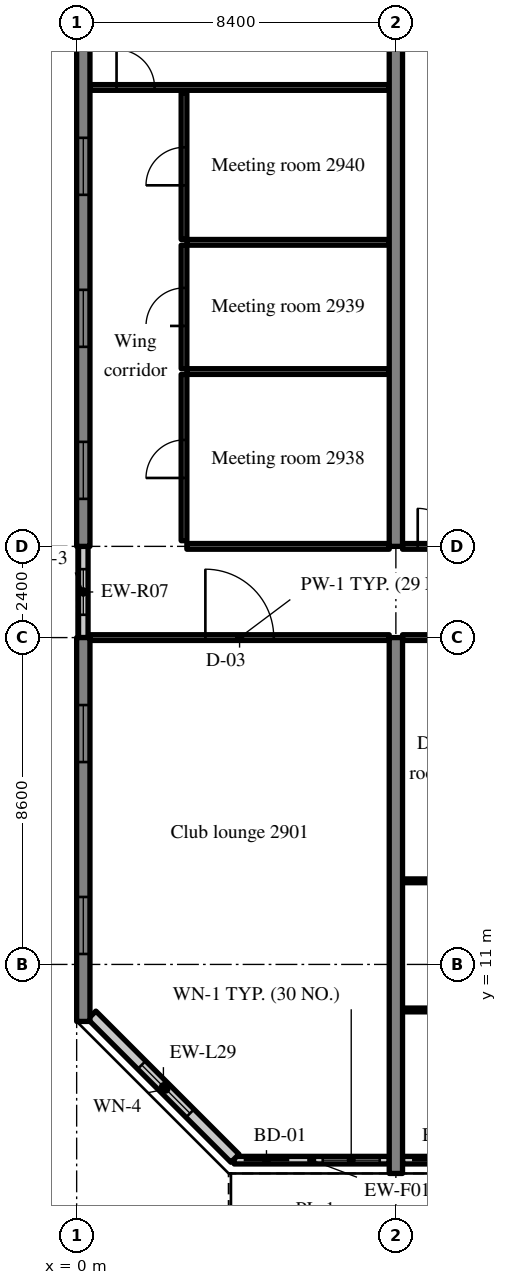
"""IFC4 building model, lengths in metres.
Left out: names, types, materials, properties, quantities, classifications, styles, units other than length and angle.
Written with IfcOpenShell. Run it as: python <this file> out.ifc"""

import sys

from ifc_helpers import new_model, si_unit, direction, frame, frame_2d, origin, place, context, subcontext, project, spatial, rectangle, extrude, source, transform, mapped, element, fill, save


model = new_model("IFC4")
c1 = context("Model", 3, precision=1e-05, world=origin(), true_north=direction((0.0, 1.0)))
c2 = subcontext(c1, "Body", "Model", "MODEL_VIEW")
j1 = project(units=[si_unit("LENGTHUNIT", "METRE"), si_unit("PLANEANGLEUNIT", "RADIAN")], contexts=[c1])
p1 = place(None, origin())
s1 = spatial("IfcSite", under=j1, at=p1, CompositionType="ELEMENT")
p2 = place(p1, origin())
s2 = spatial("IfcBuilding", under=s1, at=p2, CompositionType="ELEMENT")
p3 = place(p2, frame((0.0, 0.0, 121.8)))
s3 = spatial("IfcBuildingStorey", under=s2, at=p3, CompositionType="ELEMENT", Elevation=121.8)
m1 = source(origin(), c2, "Body", "SweptSolid", [
    extrude(rectangle(XDim=10.1, YDim=0.35, at=frame_2d((5.05, 0.0))), origin(), (0.0, 0.0, 1.0), 3.52),
])
p4 = place(p3, frame((0.175, 9.5, 0.0), z_axis=(0.0, 0.0, 1.0), x_axis=(0.0, 1.0, 0.0)))
e1 = element("IfcWall", 1, at=p4, inside=s3, PredefinedType="SHEAR", context=c2, shape_type="MappedRepresentation", body=[
    mapped(m1, transform((0.0, 0.0, 0.0), scale=1.0)),
])
m2 = source(origin(), c2, "Body", "SweptSolid", [
    extrude(rectangle(XDim=1.5, YDim=1.5, at=frame_2d((0.75, 0.75))), frame((0.0, 0.185, 0.0), z_axis=(0.0, -1.0, 0.0), x_axis=(1.0, 0.0, 0.0)), (0.0, 0.0, 1.0), 0.37),
])
p5 = place(p4, frame((1.775, 0.0, 0.9)))
e2 = element("IfcOpeningElement", 2, at=p5, cuts=e1, PredefinedType="OPENING", context=c2, shape_type="MappedRepresentation", body=[
    mapped(m2, transform((0.0, 0.0, 0.0), scale=1.0)),
])
p6 = place(p4, frame((6.825, 0.0, 0.9)))
e3 = element("IfcOpeningElement", 3, at=p6, cuts=e1, PredefinedType="OPENING", context=c2, shape_type="MappedRepresentation", body=[
    mapped(m2, transform((0.0, 0.0, 0.0), scale=1.0)),
])
m3 = source(origin(), c2, "Body", "SweptSolid", [
    extrude(rectangle(XDim=16.0, YDim=0.35, at=frame_2d((8.0, 0.0))), origin(), (0.0, 0.0, 1.0), 3.52),
])
p7 = place(p3, frame((0.175, 22.0, 0.0), z_axis=(0.0, 0.0, 1.0), x_axis=(0.0, 1.0, 0.0)))
e4 = element("IfcWall", 4, at=p7, inside=s3, PredefinedType="SHEAR", context=c2, shape_type="MappedRepresentation", body=[
    mapped(m3, transform((0.0, 0.0, 0.0), scale=1.0)),
])
p8 = place(p7, frame((1.25, 0.0, 0.9)))
e5 = element("IfcOpeningElement", 5, at=p8, cuts=e4, PredefinedType="OPENING", context=c2, shape_type="MappedRepresentation", body=[
    mapped(m2, transform((0.0, 0.0, 0.0), scale=1.0)),
])
p9 = place(p7, frame((5.25, 0.0, 0.9)))
e6 = element("IfcOpeningElement", 6, at=p9, cuts=e4, PredefinedType="OPENING", context=c2, shape_type="MappedRepresentation", body=[
    mapped(m2, transform((0.0, 0.0, 0.0), scale=1.0)),
])
p10 = place(p7, frame((9.25, 0.0, 0.9)))
e7 = element("IfcOpeningElement", 7, at=p10, cuts=e4, PredefinedType="OPENING", context=c2, shape_type="MappedRepresentation", body=[
    mapped(m2, transform((0.0, 0.0, 0.0), scale=1.0)),
])
p11 = place(p7, frame((13.25, 0.0, 0.9)))
e8 = element("IfcOpeningElement", 8, at=p11, cuts=e4, PredefinedType="OPENING", context=c2, shape_type="MappedRepresentation", body=[
    mapped(m2, transform((0.0, 0.0, 0.0), scale=1.0)),
])
m4 = source(origin(), c2, "Body", "SweptSolid", [
    extrude(rectangle(XDim=14.1, YDim=0.35, at=frame_2d((7.05, 0.0))), origin(), (0.0, 0.0, 1.0), 3.52),
])
p12 = place(p3, frame((8.4, 5.5, 0.0), z_axis=(0.0, 0.0, 1.0), x_axis=(0.0, 1.0, 0.0)))
e9 = element("IfcWall", 9, at=p12, inside=s3, PredefinedType="SHEAR", context=c2, shape_type="MappedRepresentation", body=[
    mapped(m4, transform((0.0, 0.0, 0.0), scale=1.0)),
])
m5 = source(origin(), c2, "Body", "SweptSolid", [
    extrude(rectangle(XDim=20.0, YDim=0.35, at=frame_2d((10.0, 0.0))), origin(), (0.0, 0.0, 1.0), 3.52),
])
p13 = place(p3, frame((8.4, 22.0, 0.0), z_axis=(0.0, 0.0, 1.0), x_axis=(0.0, 1.0, 0.0)))
e10 = element("IfcWall", 10, at=p13, inside=s3, PredefinedType="SHEAR", context=c2, shape_type="MappedRepresentation", body=[
    mapped(m5, transform((0.0, 0.0, 0.0), scale=1.0)),
])
m6 = source(origin(), c2, "Body", "SweptSolid", [
    extrude(rectangle(XDim=4.08, YDim=0.2, at=frame_2d((2.04, 0.0))), origin(), (0.0, 0.0, 1.0), 2.82),
])
p14 = place(p3, frame((4.145, 5.85, 0.0), z_axis=(0.0, 0.0, 1.0), x_axis=(1.0, 0.0, 0.0)))
e11 = element("IfcWall", 11, at=p14, inside=s3, PredefinedType="SOLIDWALL", context=c2, shape_type="MappedRepresentation", body=[
    mapped(m6, transform((0.0, 0.0, 0.0), scale=1.0)),
])
m7 = source(origin(), c2, "Body", "SweptSolid", [
    extrude(rectangle(XDim=1.2, YDim=2.4, at=frame_2d((0.6, 1.2))), frame((0.0, 0.11, 0.0), z_axis=(0.0, -1.0, 0.0), x_axis=(1.0, 0.0, 0.0)), (0.0, 0.0, 1.0), 0.22),
])
p15 = place(p14, frame((0.25, 0.0, 0.0)))
e12 = element("IfcOpeningElement", 12, at=p15, cuts=e11, PredefinedType="OPENING", context=c2, shape_type="MappedRepresentation", body=[
    mapped(m7, transform((0.0, 0.0, 0.0), scale=1.0)),
])
m8 = source(origin(), c2, "Body", "SweptSolid", [
    extrude(rectangle(XDim=1.5, YDim=1.5, at=frame_2d((0.75, 0.75))), frame((0.0, 0.11, 0.0), z_axis=(0.0, -1.0, 0.0), x_axis=(1.0, 0.0, 0.0)), (0.0, 0.0, 1.0), 0.22),
])
p16 = place(p14, frame((2.33, 0.0, 0.9)))
e13 = element("IfcOpeningElement", 13, at=p16, cuts=e11, PredefinedType="OPENING", context=c2, shape_type="MappedRepresentation", body=[
    mapped(m8, transform((0.0, 0.0, 0.0), scale=1.0)),
])
m9 = source(origin(), c2, "Body", "SweptSolid", [
    extrude(rectangle(XDim=8.05, YDim=0.2, at=frame_2d((4.025, 0.0))), origin(), (0.0, 0.0, 1.0), 2.82),
])
p17 = place(p3, frame((8.575, 5.85, 0.0), z_axis=(0.0, 0.0, 1.0), x_axis=(1.0, 0.0, 0.0)))
e14 = element("IfcWall", 14, at=p17, inside=s3, PredefinedType="SOLIDWALL", context=c2, shape_type="MappedRepresentation", body=[
    mapped(m9, transform((0.0, 0.0, 0.0), scale=1.0)),
])
p18 = place(p17, frame((0.25, 0.0, 0.0)))
e15 = element("IfcOpeningElement", 15, at=p18, cuts=e14, PredefinedType="OPENING", context=c2, shape_type="MappedRepresentation", body=[
    mapped(m7, transform((0.0, 0.0, 0.0), scale=1.0)),
])
p19 = place(p17, frame((2.275, 0.0, 0.9)))
e16 = element("IfcOpeningElement", 16, at=p19, cuts=e14, PredefinedType="OPENING", context=c2, shape_type="MappedRepresentation", body=[
    mapped(m8, transform((0.0, 0.0, 0.0), scale=1.0)),
])
p20 = place(p17, frame((4.275, 0.0, 0.0)))
e17 = element("IfcOpeningElement", 17, at=p20, cuts=e14, PredefinedType="OPENING", context=c2, shape_type="MappedRepresentation", body=[
    mapped(m7, transform((0.0, 0.0, 0.0), scale=1.0)),
])
p21 = place(p17, frame((6.3, 0.0, 0.9)))
e18 = element("IfcOpeningElement", 18, at=p21, cuts=e14, PredefinedType="OPENING", context=c2, shape_type="MappedRepresentation", body=[
    mapped(m8, transform((0.0, 0.0, 0.0), scale=1.0)),
])
m10 = source(origin(), c2, "Body", "SweptSolid", [
    extrude(rectangle(XDim=5.326, YDim=0.3, at=frame_2d((2.663, 0.0))), origin(), (0.0, 0.0, 1.0), 3.52),
])
p22 = place(p3, frame((0.4, 9.666, 0.0), z_axis=(0.0, 0.0, 1.0), x_axis=(0.707106781187, -0.707106781187, 0.0)))
e19 = element("IfcWall", 19, at=p22, inside=s3, PredefinedType="SOLIDWALL", context=c2, shape_type="MappedRepresentation", body=[
    mapped(m10, transform((0.0, 0.0, 0.0), scale=1.0)),
])
m11 = source(origin(), c2, "Body", "SweptSolid", [
    extrude(rectangle(XDim=1.8, YDim=1.5, at=frame_2d((0.9, 0.75))), frame((0.0, 0.16, 0.0), z_axis=(0.0, -1.0, 0.0), x_axis=(1.0, 0.0, 0.0)), (0.0, 0.0, 1.0), 0.32),
])
p23 = place(p22, frame((1.854, 0.0, 0.9)))
e20 = element("IfcOpeningElement", 20, at=p23, cuts=e19, PredefinedType="OPENING", context=c2, shape_type="MappedRepresentation", body=[
    mapped(m11, transform((0.0, 0.0, 0.0), scale=1.0)),
])
m12 = source(origin(), c2, "Body", "SweptSolid", [
    extrude(rectangle(XDim=2.4, YDim=0.25, at=frame_2d((1.2, 0.0))), origin(), (0.0, 0.0, 1.0), 2.62),
])
p24 = place(p3, frame((0.175, 19.6, 0.0), z_axis=(0.0, 0.0, 1.0), x_axis=(0.0, 1.0, 0.0)))
e21 = element("IfcWall", 21, at=p24, inside=s3, PredefinedType="SOLIDWALL", context=c2, shape_type="MappedRepresentation", body=[
    mapped(m12, transform((0.0, 0.0, 0.0), scale=1.0)),
])
m13 = source(origin(), c2, "Body", "SweptSolid", [
    extrude(rectangle(XDim=1.2, YDim=1.5, at=frame_2d((0.6, 0.75))), frame((0.0, 0.135, 0.0), z_axis=(0.0, -1.0, 0.0), x_axis=(1.0, 0.0, 0.0)), (0.0, 0.0, 1.0), 0.27),
])
p25 = place(p24, frame((0.6, 0.0, 0.9)))
e22 = element("IfcOpeningElement", 22, at=p25, cuts=e21, PredefinedType="OPENING", context=c2, shape_type="MappedRepresentation", body=[
    mapped(m13, transform((0.0, 0.0, 0.0), scale=1.0)),
])
m14 = source(origin(), c2, "Body", "SweptSolid", [
    extrude(rectangle(XDim=7.875, YDim=0.15, at=frame_2d((3.938, 0.0))), origin(), (0.0, 0.0, 1.0), 2.82),
])
p26 = place(p3, frame((0.35, 19.6, 0.0), z_axis=(0.0, 0.0, 1.0), x_axis=(1.0, 0.0, 0.0)))
e23 = element("IfcWall", 23, at=p26, inside=s3, PredefinedType="PARTITIONING", context=c2, shape_type="MappedRepresentation", body=[
    mapped(m14, transform((0.0, 0.0, 0.0), scale=1.0)),
])
m15 = source(origin(), c2, "Body", "SweptSolid", [
    extrude(rectangle(XDim=1.8, YDim=2.1, at=frame_2d((0.9, 1.05))), frame((0.0, 0.085, 0.0), z_axis=(0.0, -1.0, 0.0), x_axis=(1.0, 0.0, 0.0)), (0.0, 0.0, 1.0), 0.17),
])
p27 = place(p26, frame((3.037, 0.0, 0.0)))
e24 = element("IfcOpeningElement", 24, at=p27, cuts=e23, PredefinedType="OPENING", context=c2, shape_type="MappedRepresentation", body=[
    mapped(m15, transform((0.0, 0.0, 0.0), scale=1.0)),
])
m16 = source(origin(), c2, "Body", "SweptSolid", [
    extrude(rectangle(XDim=2.6, YDim=0.1, at=frame_2d((1.3, 0.0))), origin(), (0.0, 0.0, 1.0), 3.52),
])
p28 = place(p3, frame((8.575, 13.2, 0.0), z_axis=(0.0, 0.0, 1.0), x_axis=(1.0, 0.0, 0.0)))
e25 = element("IfcWall", 25, at=p28, inside=s3, PredefinedType="PARTITIONING", context=c2, shape_type="MappedRepresentation", body=[
    mapped(m16, transform((0.0, 0.0, 0.0), scale=1.0)),
])
m17 = source(origin(), c2, "Body", "SweptSolid", [
    extrude(rectangle(XDim=0.9, YDim=2.1, at=frame_2d((0.45, 1.05))), frame((0.0, 0.06, 0.0), z_axis=(0.0, -1.0, 0.0), x_axis=(1.0, 0.0, 0.0)), (0.0, 0.0, 1.0), 0.12),
])
p29 = place(p28, frame((0.85, 0.0, 0.0)))
e26 = element("IfcOpeningElement", 26, at=p29, cuts=e25, PredefinedType="OPENING", context=c2, shape_type="MappedRepresentation", body=[
    mapped(m17, transform((0.0, 0.0, 0.0), scale=1.0)),
])
m18 = source(origin(), c2, "Body", "SweptSolid", [
    extrude(rectangle(XDim=8.05, YDim=0.1, at=frame_2d((4.025, 0.0))), origin(), (0.0, 0.0, 1.0), 3.52),
])
p30 = place(p3, frame((8.575, 9.802, 0.0), z_axis=(0.0, 0.0, 1.0), x_axis=(1.0, 0.0, 0.0)))
e27 = element("IfcWall", 27, at=p30, inside=s3, PredefinedType="PARTITIONING", context=c2, shape_type="MappedRepresentation", body=[
    mapped(m18, transform((0.0, 0.0, 0.0), scale=1.0)),
])
m19 = source(origin(), c2, "Body", "SweptSolid", [
    extrude(rectangle(XDim=1.8, YDim=2.1, at=frame_2d((0.9, 1.05))), frame((0.0, 0.06, 0.0), z_axis=(0.0, -1.0, 0.0), x_axis=(1.0, 0.0, 0.0)), (0.0, 0.0, 1.0), 0.12),
])
p31 = place(p30, frame((3.125, 0.0, 0.0)))
e28 = element("IfcOpeningElement", 28, at=p31, cuts=e27, PredefinedType="OPENING", context=c2, shape_type="MappedRepresentation", body=[
    mapped(m19, transform((0.0, 0.0, 0.0), scale=1.0)),
])
m20 = source(origin(), c2, "Body", "SweptSolid", [
    extrude(rectangle(XDim=8.05, YDim=0.15, at=frame_2d((4.025, 0.0))), origin(), (0.0, 0.0, 1.0), 2.82),
])
p32 = place(p3, frame((8.575, 19.6, 0.0), z_axis=(0.0, 0.0, 1.0), x_axis=(1.0, 0.0, 0.0)))
e29 = element("IfcWall", 29, at=p32, inside=s3, PredefinedType="PARTITIONING", context=c2, shape_type="MappedRepresentation", body=[
    mapped(m20, transform((0.0, 0.0, 0.0), scale=1.0)),
])
m21 = source(origin(), c2, "Body", "SweptSolid", [
    extrude(rectangle(XDim=1.0, YDim=2.1, at=frame_2d((0.5, 1.05))), frame((0.0, 0.085, 0.0), z_axis=(0.0, -1.0, 0.0), x_axis=(1.0, 0.0, 0.0)), (0.0, 0.0, 1.0), 0.17),
])
p33 = place(p32, frame((6.65, 0.0, 0.0)))
e30 = element("IfcOpeningElement", 30, at=p33, cuts=e29, PredefinedType="OPENING", context=c2, shape_type="MappedRepresentation", body=[
    mapped(m21, transform((0.0, 0.0, 0.0), scale=1.0)),
])
m22 = source(origin(), c2, "Body", "SweptSolid", [
    extrude(rectangle(XDim=5.325, YDim=0.15, at=frame_2d((2.663, 0.0))), origin(), (0.0, 0.0, 1.0), 2.82),
])
p34 = place(p3, frame((2.9, 22.0, 0.0), z_axis=(0.0, 0.0, 1.0), x_axis=(1.0, 0.0, 0.0)))
e31 = element("IfcWall", 31, at=p34, inside=s3, PredefinedType="PARTITIONING", context=c2, shape_type="MappedRepresentation", body=[
    mapped(m22, transform((0.0, 0.0, 0.0), scale=1.0)),
])
m23 = source(origin(), c2, "Body", "SweptSolid", [
    extrude(rectangle(XDim=4.375, YDim=0.15, at=frame_2d((2.188, 0.0))), origin(), (0.0, 0.0, 1.0), 3.52),
])
p35 = place(p3, frame((2.825, 22.15, 0.0), z_axis=(0.0, 0.0, 1.0), x_axis=(0.0, 1.0, 0.0)))
e32 = element("IfcWall", 32, at=p35, inside=s3, PredefinedType="PARTITIONING", context=c2, shape_type="MappedRepresentation", body=[
    mapped(m23, transform((0.0, 0.0, 0.0), scale=1.0)),
])
p36 = place(p35, frame((1.65, 0.0, 0.0)))
e33 = element("IfcOpeningElement", 33, at=p36, cuts=e32, PredefinedType="OPENING", context=c2, shape_type="MappedRepresentation", body=[
    mapped(m21, transform((0.0, 0.0, 0.0), scale=1.0)),
])
m24 = source(origin(), c2, "Body", "SweptSolid", [
    extrude(rectangle(XDim=5.325, YDim=0.15, at=frame_2d((2.663, 0.0))), origin(), (0.0, 0.0, 1.0), 3.52),
])
p37 = place(p3, frame((2.9, 26.6, 0.0), z_axis=(0.0, 0.0, 1.0), x_axis=(1.0, 0.0, 0.0)))
e34 = element("IfcWall", 34, at=p37, inside=s3, PredefinedType="PARTITIONING", context=c2, shape_type="MappedRepresentation", body=[
    mapped(m24, transform((0.0, 0.0, 0.0), scale=1.0)),
])
m25 = source(origin(), c2, "Body", "SweptSolid", [
    extrude(rectangle(XDim=3.25, YDim=0.15, at=frame_2d((1.625, 0.0))), origin(), (0.0, 0.0, 1.0), 3.52),
])
p38 = place(p3, frame((2.825, 26.675, 0.0), z_axis=(0.0, 0.0, 1.0), x_axis=(0.0, 1.0, 0.0)))
e35 = element("IfcWall", 35, at=p38, inside=s3, PredefinedType="PARTITIONING", context=c2, shape_type="MappedRepresentation", body=[
    mapped(m25, transform((0.0, 0.0, 0.0), scale=1.0)),
])
p39 = place(p38, frame((1.125, 0.0, 0.0)))
e36 = element("IfcOpeningElement", 36, at=p39, cuts=e35, PredefinedType="OPENING", context=c2, shape_type="MappedRepresentation", body=[
    mapped(m21, transform((0.0, 0.0, 0.0), scale=1.0)),
])
p40 = place(p3, frame((2.9, 30.0, 0.0), z_axis=(0.0, 0.0, 1.0), x_axis=(1.0, 0.0, 0.0)))
e37 = element("IfcWall", 37, at=p40, inside=s3, PredefinedType="PARTITIONING", context=c2, shape_type="MappedRepresentation", body=[
    mapped(m24, transform((0.0, 0.0, 0.0), scale=1.0)),
])
m26 = source(origin(), c2, "Body", "SweptSolid", [
    extrude(rectangle(XDim=3.85, YDim=0.15, at=frame_2d((1.925, 0.0))), origin(), (0.0, 0.0, 1.0), 3.52),
])
p41 = place(p3, frame((2.825, 30.075, 0.0), z_axis=(0.0, 0.0, 1.0), x_axis=(0.0, 1.0, 0.0)))
e38 = element("IfcWall", 38, at=p41, inside=s3, PredefinedType="PARTITIONING", context=c2, shape_type="MappedRepresentation", body=[
    mapped(m26, transform((0.0, 0.0, 0.0), scale=1.0)),
])
p42 = place(p41, frame((1.425, 0.0, 0.0)))
e39 = element("IfcOpeningElement", 39, at=p42, cuts=e38, PredefinedType="OPENING", context=c2, shape_type="MappedRepresentation", body=[
    mapped(m21, transform((0.0, 0.0, 0.0), scale=1.0)),
])
m27 = source(origin(), c2, "Body", "SweptSolid", [
    extrude(rectangle(XDim=7.875, YDim=0.15, at=frame_2d((3.938, 0.0))), origin(), (0.0, 0.0, 1.0), 3.52),
])
p43 = place(p3, frame((0.35, 34.075, 0.0), z_axis=(0.0, 0.0, 1.0), x_axis=(1.0, 0.0, 0.0)))
e40 = element("IfcWall", 40, at=p43, inside=s3, PredefinedType="PARTITIONING", context=c2, shape_type="MappedRepresentation", body=[
    mapped(m27, transform((0.0, 0.0, 0.0), scale=1.0)),
])
p44 = place(p43, frame((0.7, 0.0, 0.0)))
e41 = element("IfcOpeningElement", 41, at=p44, cuts=e40, PredefinedType="OPENING", context=c2, shape_type="MappedRepresentation", body=[
    mapped(m21, transform((0.0, 0.0, 0.0), scale=1.0)),
])
p45 = place(p3, frame((8.575, 22.0, 0.0), z_axis=(0.0, 0.0, 1.0), x_axis=(1.0, 0.0, 0.0)))
e42 = element("IfcWall", 42, at=p45, inside=s3, PredefinedType="PARTITIONING", context=c2, shape_type="MappedRepresentation", body=[
    mapped(m20, transform((0.0, 0.0, 0.0), scale=1.0)),
])
p46 = place(p45, frame((0.4, 0.0, 0.0)))
e43 = element("IfcOpeningElement", 43, at=p46, cuts=e42, PredefinedType="OPENING", context=c2, shape_type="MappedRepresentation", body=[
    mapped(m21, transform((0.0, 0.0, 0.0), scale=1.0)),
])
m28 = source(origin(), c2, "Body", "SweptSolid", [
    extrude(rectangle(XDim=1.2, YDim=2.4, at=frame_2d((0.6, 1.2))), frame((0.0, 0.025, 0.0), z_axis=(0.0, -1.0, 0.0), x_axis=(1.0, 0.0, 0.0)), (0.0, 0.0, 1.0), 0.05),
])
p47 = place(p15, origin())
e44 = element("IfcDoor", 44, at=p47, inside=s3, OperationType="SLIDING_TO_LEFT", PredefinedType="DOOR", context=c2, shape_type="MappedRepresentation", body=[
    mapped(m28, transform((0.0, 0.0, 0.0), scale=1.0)),
])
fill(e12, e44)
m29 = source(origin(), c2, "Body", "SweptSolid", [
    extrude(rectangle(XDim=1.5, YDim=1.5, at=frame_2d((0.75, 0.75))), frame((0.0, 0.03, 0.0), z_axis=(0.0, -1.0, 0.0), x_axis=(1.0, 0.0, 0.0)), (0.0, 0.0, 1.0), 0.06),
])
p48 = place(p16, origin())
e45 = element("IfcWindow", 45, at=p48, inside=s3, PartitioningType="SINGLE_PANEL", PredefinedType="WINDOW", context=c2, shape_type="MappedRepresentation", body=[
    mapped(m29, transform((0.0, 0.0, 0.0), scale=1.0)),
])
fill(e13, e45)
p49 = place(p18, origin())
e46 = element("IfcDoor", 46, at=p49, inside=s3, OperationType="SLIDING_TO_RIGHT", PredefinedType="DOOR", context=c2, shape_type="MappedRepresentation", body=[
    mapped(m28, transform((0.0, 0.0, 0.0), scale=1.0)),
])
fill(e15, e46)
m30 = source(origin(), c2, "Body", "SweptSolid", [
    extrude(rectangle(XDim=1.8, YDim=1.5, at=frame_2d((0.9, 0.75))), frame((0.0, 0.03, 0.0), z_axis=(0.0, -1.0, 0.0), x_axis=(1.0, 0.0, 0.0)), (0.0, 0.0, 1.0), 0.06),
])
p50 = place(p23, origin())
e47 = element("IfcWindow", 47, at=p50, inside=s3, PartitioningType="SINGLE_PANEL", PredefinedType="WINDOW", context=c2, shape_type="MappedRepresentation", body=[
    mapped(m30, transform((0.0, 0.0, 0.0), scale=1.0)),
])
fill(e20, e47)
p51 = place(p5, origin())
e48 = element("IfcWindow", 48, at=p51, inside=s3, PartitioningType="SINGLE_PANEL", PredefinedType="WINDOW", context=c2, shape_type="MappedRepresentation", body=[
    mapped(m29, transform((0.0, 0.0, 0.0), scale=1.0)),
])
fill(e2, e48)
p52 = place(p6, origin())
e49 = element("IfcWindow", 49, at=p52, inside=s3, PartitioningType="SINGLE_PANEL", PredefinedType="WINDOW", context=c2, shape_type="MappedRepresentation", body=[
    mapped(m29, transform((0.0, 0.0, 0.0), scale=1.0)),
])
fill(e3, e49)
p53 = place(p8, origin())
e50 = element("IfcWindow", 50, at=p53, inside=s3, PartitioningType="SINGLE_PANEL", PredefinedType="WINDOW", context=c2, shape_type="MappedRepresentation", body=[
    mapped(m29, transform((0.0, 0.0, 0.0), scale=1.0)),
])
fill(e5, e50)
p54 = place(p9, origin())
e51 = element("IfcWindow", 51, at=p54, inside=s3, PartitioningType="SINGLE_PANEL", PredefinedType="WINDOW", context=c2, shape_type="MappedRepresentation", body=[
    mapped(m29, transform((0.0, 0.0, 0.0), scale=1.0)),
])
fill(e6, e51)
p55 = place(p10, origin())
e52 = element("IfcWindow", 52, at=p55, inside=s3, PartitioningType="SINGLE_PANEL", PredefinedType="WINDOW", context=c2, shape_type="MappedRepresentation", body=[
    mapped(m29, transform((0.0, 0.0, 0.0), scale=1.0)),
])
fill(e7, e52)
m31 = source(origin(), c2, "Body", "SweptSolid", [
    extrude(rectangle(XDim=1.2, YDim=1.5, at=frame_2d((0.6, 0.75))), frame((0.0, 0.03, 0.0), z_axis=(0.0, -1.0, 0.0), x_axis=(1.0, 0.0, 0.0)), (0.0, 0.0, 1.0), 0.06),
])
p56 = place(p25, origin())
e53 = element("IfcWindow", 53, at=p56, inside=s3, PartitioningType="SINGLE_PANEL", PredefinedType="WINDOW", context=c2, shape_type="MappedRepresentation", body=[
    mapped(m31, transform((0.0, 0.0, 0.0), scale=1.0)),
])
fill(e22, e53)
m32 = source(origin(), c2, "Body", "SweptSolid", [
    extrude(rectangle(XDim=1.8, YDim=2.1, at=frame_2d((0.9, 1.05))), frame((0.0, 0.025, 0.0), z_axis=(0.0, -1.0, 0.0), x_axis=(1.0, 0.0, 0.0)), (0.0, 0.0, 1.0), 0.05),
])
p57 = place(p27, origin())
e54 = element("IfcDoor", 54, at=p57, inside=s3, OperationType="DOUBLE_DOOR_SINGLE_SWING", PredefinedType="DOOR", context=c2, shape_type="MappedRepresentation", body=[
    mapped(m32, transform((0.0, 0.0, 0.0), scale=1.0)),
])
fill(e24, e54)
m33 = source(origin(), c2, "Body", "SweptSolid", [
    extrude(rectangle(XDim=1.0, YDim=2.1, at=frame_2d((0.5, 1.05))), frame((0.0, 0.025, 0.0), z_axis=(0.0, -1.0, 0.0), x_axis=(1.0, 0.0, 0.0)), (0.0, 0.0, 1.0), 0.05),
])
p58 = place(p36, origin())
e55 = element("IfcDoor", 55, at=p58, inside=s3, OperationType="SINGLE_SWING_LEFT", PredefinedType="DOOR", context=c2, shape_type="MappedRepresentation", body=[
    mapped(m33, transform((0.0, 0.0, 0.0), scale=1.0)),
])
fill(e33, e55)
p59 = place(p39, origin())
e56 = element("IfcDoor", 56, at=p59, inside=s3, OperationType="SINGLE_SWING_LEFT", PredefinedType="DOOR", context=c2, shape_type="MappedRepresentation", body=[
    mapped(m33, transform((0.0, 0.0, 0.0), scale=1.0)),
])
fill(e36, e56)
p60 = place(p42, origin())
e57 = element("IfcDoor", 57, at=p60, inside=s3, OperationType="SINGLE_SWING_LEFT", PredefinedType="DOOR", context=c2, shape_type="MappedRepresentation", body=[
    mapped(m33, transform((0.0, 0.0, 0.0), scale=1.0)),
])
fill(e39, e57)
p61 = place(p44, origin())
e58 = element("IfcDoor", 58, at=p61, inside=s3, OperationType="SINGLE_SWING_LEFT", PredefinedType="DOOR", context=c2, shape_type="MappedRepresentation", body=[
    mapped(m33, transform((0.0, 0.0, 0.0), scale=1.0)),
])
fill(e41, e58)
p62 = place(p46, origin())
e59 = element("IfcDoor", 59, at=p62, inside=s3, OperationType="SINGLE_SWING_LEFT", PredefinedType="DOOR", context=c2, shape_type="MappedRepresentation", body=[
    mapped(m33, transform((0.0, 0.0, 0.0), scale=1.0)),
])
fill(e43, e59)
save(model, sys.argv[1])
